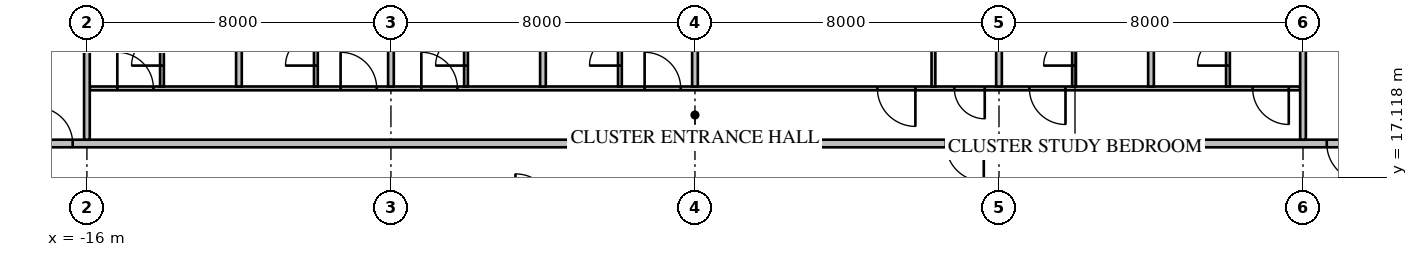
"""IFC4 building model, lengths in metres.
Left out: names, types, materials, properties, quantities, classifications, styles, units other than length and angle.
Written with IfcOpenShell. Run it as: python <this file> out.ifc"""

import sys

from ifc_helpers import new_model, si_unit, direction, frame, frame_2d, origin, place, context, subcontext, project, spatial, rectangle, extrude, element, fill, save


model = new_model("IFC4")
c1 = context("Model", 3, precision=1e-05, world=origin(), true_north=direction((0.0, 1.0)))
c2 = subcontext(c1, "Body", "Model", "MODEL_VIEW")
j1 = project(units=[si_unit("LENGTHUNIT", "METRE"), si_unit("PLANEANGLEUNIT", "RADIAN")], contexts=[c1])
p1 = place(None, origin())
s1 = spatial("IfcSite", under=j1, at=p1, CompositionType="ELEMENT")
p2 = place(p1, origin())
s2 = spatial("IfcBuilding", under=s1, at=p2, CompositionType="ELEMENT")
p3 = place(p2, frame((0.0, 0.0, 31.4)))
s3 = spatial("IfcBuildingStorey", under=s2, at=p3, CompositionType="ELEMENT", Elevation=31.4)
p4 = place(p3, frame((18.0, 18.0, 0.0), z_axis=(0.0, 0.0, 1.0), x_axis=(-1.0, 0.0, 0.0)))
e1 = element("IfcWall", 1, at=p4, inside=s3, PredefinedType="PARTITIONING", context=c2, shape_type="SweptSolid", body=[
    extrude(rectangle(XDim=36.0, YDim=0.2, at=frame_2d((18.0, 0.0))), origin(), (0.0, 0.0, 1.0), 3.65),
])
p5 = place(p4, frame((10.4, 0.0, 0.0)))
e2 = element("IfcOpeningElement", 2, at=p5, cuts=e1, PredefinedType="OPENING", context=c2, shape_type="SweptSolid", body=[
    extrude(rectangle(XDim=1.0, YDim=2.1, at=frame_2d((0.5, 1.05))), frame((0.0, 0.12, 0.0), z_axis=(0.0, -1.0, 0.0), x_axis=(1.0, 0.0, 0.0)), (0.0, 0.0, 1.0), 0.24),
])
p6 = place(p4, frame((0.375, 0.0, 0.0)))
e3 = element("IfcOpeningElement", 3, at=p6, cuts=e1, PredefinedType="OPENING", context=c2, shape_type="SweptSolid", body=[
    extrude(rectangle(XDim=1.0, YDim=2.1, at=frame_2d((0.5, 1.05))), frame((0.0, 0.12, 0.0), z_axis=(0.0, -1.0, 0.0), x_axis=(1.0, 0.0, 0.0)), (0.0, 0.0, 1.0), 0.24),
])
p7 = place(p4, frame((34.375, 0.0, 0.0)))
e4 = element("IfcOpeningElement", 4, at=p7, cuts=e1, PredefinedType="OPENING", context=c2, shape_type="SweptSolid", body=[
    extrude(rectangle(XDim=0.95, YDim=2.1, at=frame_2d((0.475, 1.05))), frame((0.0, 0.12, 0.0), z_axis=(0.0, -1.0, 0.0), x_axis=(1.0, 0.0, 0.0)), (0.0, 0.0, 1.0), 0.24),
])
p8 = place(p3, frame((15.925, 19.45, 0.0), z_axis=(0.0, 0.0, 1.0), x_axis=(-1.0, 0.0, 0.0)))
e5 = element("IfcWall", 5, at=p8, inside=s3, PredefinedType="PARTITIONING", context=c2, shape_type="SweptSolid", body=[
    extrude(rectangle(XDim=31.85, YDim=0.1, at=frame_2d((15.925, 0.0))), origin(), (0.0, 0.0, 1.0), 3.65),
])
p9 = place(p8, frame((10.125, 0.0, 0.0)))
e6 = element("IfcOpeningElement", 6, at=p9, cuts=e5, PredefinedType="OPENING", context=c2, shape_type="SweptSolid", body=[
    extrude(rectangle(XDim=1.0, YDim=2.1, at=frame_2d((0.5, 1.05))), frame((0.0, 0.07, 0.0), z_axis=(0.0, -1.0, 0.0), x_axis=(1.0, 0.0, 0.0)), (0.0, 0.0, 1.0), 0.14),
])
p10 = place(p8, frame((8.3, 0.0, 0.0)))
e7 = element("IfcOpeningElement", 7, at=p10, cuts=e5, PredefinedType="OPENING", context=c2, shape_type="SweptSolid", body=[
    extrude(rectangle(XDim=0.8, YDim=2.1, at=frame_2d((0.4, 1.05))), frame((0.0, 0.07, 0.0), z_axis=(0.0, -1.0, 0.0), x_axis=(1.0, 0.0, 0.0)), (0.0, 0.0, 1.0), 0.14),
])
p11 = place(p8, frame((0.3, 0.0, 0.0)))
e8 = element("IfcOpeningElement", 8, at=p11, cuts=e5, PredefinedType="OPENING", context=c2, shape_type="SweptSolid", body=[
    extrude(rectangle(XDim=0.95, YDim=2.1, at=frame_2d((0.475, 1.05))), frame((0.0, 0.07, 0.0), z_axis=(0.0, -1.0, 0.0), x_axis=(1.0, 0.0, 0.0)), (0.0, 0.0, 1.0), 0.14),
])
p12 = place(p8, frame((6.175, 0.0, 0.0)))
e9 = element("IfcOpeningElement", 9, at=p12, cuts=e5, PredefinedType="OPENING", context=c2, shape_type="SweptSolid", body=[
    extrude(rectangle(XDim=0.95, YDim=2.1, at=frame_2d((0.475, 1.05))), frame((0.0, 0.07, 0.0), z_axis=(0.0, -1.0, 0.0), x_axis=(1.0, 0.0, 0.0)), (0.0, 0.0, 1.0), 0.14),
])
p13 = place(p8, frame((16.3, 0.0, 0.0)))
e10 = element("IfcOpeningElement", 10, at=p13, cuts=e5, PredefinedType="OPENING", context=c2, shape_type="SweptSolid", body=[
    extrude(rectangle(XDim=0.95, YDim=2.1, at=frame_2d((0.475, 1.05))), frame((0.0, 0.07, 0.0), z_axis=(0.0, -1.0, 0.0), x_axis=(1.0, 0.0, 0.0)), (0.0, 0.0, 1.0), 0.14),
])
p14 = place(p8, frame((22.175, 0.0, 0.0)))
e11 = element("IfcOpeningElement", 11, at=p14, cuts=e5, PredefinedType="OPENING", context=c2, shape_type="SweptSolid", body=[
    extrude(rectangle(XDim=0.95, YDim=2.1, at=frame_2d((0.475, 1.05))), frame((0.0, 0.07, 0.0), z_axis=(0.0, -1.0, 0.0), x_axis=(1.0, 0.0, 0.0)), (0.0, 0.0, 1.0), 0.14),
])
p15 = place(p8, frame((24.3, 0.0, 0.0)))
e12 = element("IfcOpeningElement", 12, at=p15, cuts=e5, PredefinedType="OPENING", context=c2, shape_type="SweptSolid", body=[
    extrude(rectangle(XDim=0.95, YDim=2.1, at=frame_2d((0.475, 1.05))), frame((0.0, 0.07, 0.0), z_axis=(0.0, -1.0, 0.0), x_axis=(1.0, 0.0, 0.0)), (0.0, 0.0, 1.0), 0.14),
])
p16 = place(p8, frame((30.175, 0.0, 0.0)))
e13 = element("IfcOpeningElement", 13, at=p16, cuts=e5, PredefinedType="OPENING", context=c2, shape_type="SweptSolid", body=[
    extrude(rectangle(XDim=0.95, YDim=2.1, at=frame_2d((0.475, 1.05))), frame((0.0, 0.07, 0.0), z_axis=(0.0, -1.0, 0.0), x_axis=(1.0, 0.0, 0.0)), (0.0, 0.0, 1.0), 0.14),
])
p17 = place(p3, frame((6.275, 19.5, 0.0), z_axis=(0.0, 0.0, 1.0), x_axis=(0.0, 1.0, 0.0)))
e14 = element("IfcWall", 14, at=p17, inside=s3, PredefinedType="PARTITIONING", context=c2, shape_type="SweptSolid", body=[
    extrude(rectangle(XDim=2.1, YDim=0.1, at=frame_2d((1.05, 0.0))), origin(), (0.0, 0.0, 1.0), 3.65),
])
p18 = place(p3, frame((16.0, 18.1, 0.0), z_axis=(0.0, 0.0, 1.0), x_axis=(0.0, 1.0, 0.0)))
e15 = element("IfcWall", 15, at=p18, inside=s3, PredefinedType="PARTITIONING", context=c2, shape_type="SweptSolid", body=[
    extrude(rectangle(XDim=6.589, YDim=0.15, at=frame_2d((3.295, 0.0))), origin(), (0.0, 0.0, 1.0), 3.65),
])
for number, where, z_axis, x_axis in (
    (16, (12.0, 19.5, 0.0), (0.0, 0.0, 1.0), (0.0, 1.0, 0.0)),
    (17, (8.0, 19.5, 0.0), (0.0, 0.0, 1.0), (0.0, 1.0, 0.0)),
):
    element("IfcWall", number, at=place(p3, frame(where, z_axis=z_axis, x_axis=x_axis)), inside=s3, PredefinedType="PARTITIONING", context=c2, shape_type="SweptSolid", body=[
        extrude(rectangle(XDim=5.2, YDim=0.15, at=frame_2d((2.6, 0.0))), origin(), (0.0, 0.0, 1.0), 3.65),
    ])
p19 = place(p3, frame((0.0, 19.5, 0.0), z_axis=(0.0, 0.0, 1.0), x_axis=(0.0, 1.0, 0.0)))
e18 = element("IfcWall", 18, at=p19, inside=s3, PredefinedType="PARTITIONING", context=c2, shape_type="SweptSolid", body=[
    extrude(rectangle(XDim=5.2, YDim=0.15, at=frame_2d((2.6, 0.0))), origin(), (0.0, 0.0, 1.0), 2.809),
])
for number, where, z_axis, x_axis in (
    (19, (-4.0, 19.5, 0.0), (0.0, 0.0, 1.0), (0.0, 1.0, 0.0)),
    (20, (-8.0, 19.5, 0.0), (0.0, 0.0, 1.0), (0.0, 1.0, 0.0)),
    (21, (-12.0, 19.5, 0.0), (0.0, 0.0, 1.0), (0.0, 1.0, 0.0)),
):
    element("IfcWall", number, at=place(p3, frame(where, z_axis=z_axis, x_axis=x_axis)), inside=s3, PredefinedType="PARTITIONING", context=c2, shape_type="SweptSolid", body=[
        extrude(rectangle(XDim=5.2, YDim=0.15, at=frame_2d((2.6, 0.0))), origin(), (0.0, 0.0, 1.0), 3.65),
    ])
p20 = place(p3, frame((-16.0, 18.1, 0.0), z_axis=(0.0, 0.0, 1.0), x_axis=(0.0, 1.0, 0.0)))
e22 = element("IfcWall", 22, at=p20, inside=s3, PredefinedType="PARTITIONING", context=c2, shape_type="SweptSolid", body=[
    extrude(rectangle(XDim=6.589, YDim=0.15, at=frame_2d((3.295, 0.0))), origin(), (0.0, 0.0, 1.0), 3.65),
])
p21 = place(p3, frame((14.025, 19.5, 0.0), z_axis=(0.0, 0.0, 1.0), x_axis=(0.0, 1.0, 0.0)))
e23 = element("IfcWall", 23, at=p21, inside=s3, PredefinedType="PARTITIONING", context=c2, shape_type="SweptSolid", body=[
    extrude(rectangle(XDim=2.0, YDim=0.1, at=frame_2d((1.0, 0.0))), origin(), (0.0, 0.0, 1.0), 3.65),
])
p22 = place(p21, frame((0.55, 0.0, 0.0)))
e24 = element("IfcOpeningElement", 24, at=p22, cuts=e23, PredefinedType="OPENING", context=c2, shape_type="SweptSolid", body=[
    extrude(rectangle(XDim=0.8, YDim=2.1, at=frame_2d((0.4, 1.05))), frame((0.0, 0.07, 0.0), z_axis=(0.0, -1.0, 0.0), x_axis=(1.0, 0.0, 0.0)), (0.0, 0.0, 1.0), 0.14),
])
p23 = place(p3, frame((9.975, 19.5, 0.0), z_axis=(0.0, 0.0, 1.0), x_axis=(0.0, 1.0, 0.0)))
e25 = element("IfcWall", 25, at=p23, inside=s3, PredefinedType="PARTITIONING", context=c2, shape_type="SweptSolid", body=[
    extrude(rectangle(XDim=2.0, YDim=0.1, at=frame_2d((1.0, 0.0))), origin(), (0.0, 0.0, 1.0), 3.65),
])
p24 = place(p23, frame((0.55, 0.0, 0.0)))
e26 = element("IfcOpeningElement", 26, at=p24, cuts=e25, PredefinedType="OPENING", context=c2, shape_type="SweptSolid", body=[
    extrude(rectangle(XDim=0.8, YDim=2.1, at=frame_2d((0.4, 1.05))), frame((0.0, 0.07, 0.0), z_axis=(0.0, -1.0, 0.0), x_axis=(1.0, 0.0, 0.0)), (0.0, 0.0, 1.0), 0.14),
])
p25 = place(p3, frame((-1.975, 19.5, 0.0), z_axis=(0.0, 0.0, 1.0), x_axis=(0.0, 1.0, 0.0)))
e27 = element("IfcWall", 27, at=p25, inside=s3, PredefinedType="PARTITIONING", context=c2, shape_type="SweptSolid", body=[
    extrude(rectangle(XDim=2.0, YDim=0.1, at=frame_2d((1.0, 0.0))), origin(), (0.0, 0.0, 1.0), 3.65),
])
p26 = place(p25, frame((0.55, 0.0, 0.0)))
e28 = element("IfcOpeningElement", 28, at=p26, cuts=e27, PredefinedType="OPENING", context=c2, shape_type="SweptSolid", body=[
    extrude(rectangle(XDim=0.8, YDim=2.1, at=frame_2d((0.4, 1.05))), frame((0.0, 0.07, 0.0), z_axis=(0.0, -1.0, 0.0), x_axis=(1.0, 0.0, 0.0)), (0.0, 0.0, 1.0), 0.14),
])
p27 = place(p3, frame((-6.025, 19.5, 0.0), z_axis=(0.0, 0.0, 1.0), x_axis=(0.0, 1.0, 0.0)))
e29 = element("IfcWall", 29, at=p27, inside=s3, PredefinedType="PARTITIONING", context=c2, shape_type="SweptSolid", body=[
    extrude(rectangle(XDim=2.0, YDim=0.1, at=frame_2d((1.0, 0.0))), origin(), (0.0, 0.0, 1.0), 3.65),
])
p28 = place(p27, frame((0.55, 0.0, 0.0)))
e30 = element("IfcOpeningElement", 30, at=p28, cuts=e29, PredefinedType="OPENING", context=c2, shape_type="SweptSolid", body=[
    extrude(rectangle(XDim=0.8, YDim=2.1, at=frame_2d((0.4, 1.05))), frame((0.0, 0.07, 0.0), z_axis=(0.0, -1.0, 0.0), x_axis=(1.0, 0.0, 0.0)), (0.0, 0.0, 1.0), 0.14),
])
p29 = place(p3, frame((-9.975, 19.5, 0.0), z_axis=(0.0, 0.0, 1.0), x_axis=(0.0, 1.0, 0.0)))
e31 = element("IfcWall", 31, at=p29, inside=s3, PredefinedType="PARTITIONING", context=c2, shape_type="SweptSolid", body=[
    extrude(rectangle(XDim=2.0, YDim=0.1, at=frame_2d((1.0, 0.0))), origin(), (0.0, 0.0, 1.0), 3.65),
])
p30 = place(p29, frame((0.55, 0.0, 0.0)))
e32 = element("IfcOpeningElement", 32, at=p30, cuts=e31, PredefinedType="OPENING", context=c2, shape_type="SweptSolid", body=[
    extrude(rectangle(XDim=0.8, YDim=2.1, at=frame_2d((0.4, 1.05))), frame((0.0, 0.07, 0.0), z_axis=(0.0, -1.0, 0.0), x_axis=(1.0, 0.0, 0.0)), (0.0, 0.0, 1.0), 0.14),
])
p31 = place(p3, frame((-14.025, 19.5, 0.0), z_axis=(0.0, 0.0, 1.0), x_axis=(0.0, 1.0, 0.0)))
e33 = element("IfcWall", 33, at=p31, inside=s3, PredefinedType="PARTITIONING", context=c2, shape_type="SweptSolid", body=[
    extrude(rectangle(XDim=2.0, YDim=0.1, at=frame_2d((1.0, 0.0))), origin(), (0.0, 0.0, 1.0), 3.65),
])
p32 = place(p31, frame((0.55, 0.0, 0.0)))
e34 = element("IfcOpeningElement", 34, at=p32, cuts=e33, PredefinedType="OPENING", context=c2, shape_type="SweptSolid", body=[
    extrude(rectangle(XDim=0.8, YDim=2.1, at=frame_2d((0.4, 1.05))), frame((0.0, 0.07, 0.0), z_axis=(0.0, -1.0, 0.0), x_axis=(1.0, 0.0, 0.0)), (0.0, 0.0, 1.0), 0.14),
])
p33 = place(p5, origin())
e35 = element("IfcDoor", 35, at=p33, inside=s3, OperationType="SINGLE_SWING_LEFT", PredefinedType="DOOR", context=c2, shape_type="SweptSolid", body=[
    extrude(rectangle(XDim=1.0, YDim=2.1, at=frame_2d((0.5, 1.05))), frame((0.0, 0.025, 0.0), z_axis=(0.0, -1.0, 0.0), x_axis=(1.0, 0.0, 0.0)), (0.0, 0.0, 1.0), 0.05),
])
fill(e2, e35)
p34 = place(p9, origin())
e36 = element("IfcDoor", 36, at=p34, inside=s3, OperationType="SINGLE_SWING_LEFT", PredefinedType="DOOR", context=c2, shape_type="SweptSolid", body=[
    extrude(rectangle(XDim=1.0, YDim=2.1, at=frame_2d((0.5, 1.05))), frame((0.0, 0.025, 0.0), z_axis=(0.0, -1.0, 0.0), x_axis=(1.0, 0.0, 0.0)), (0.0, 0.0, 1.0), 0.05),
])
fill(e6, e36)
p35 = place(p10, origin())
e37 = element("IfcDoor", 37, at=p35, inside=s3, OperationType="SINGLE_SWING_LEFT", PredefinedType="DOOR", context=c2, shape_type="SweptSolid", body=[
    extrude(rectangle(XDim=0.8, YDim=2.1, at=frame_2d((0.4, 1.05))), frame((0.0, 0.025, 0.0), z_axis=(0.0, -1.0, 0.0), x_axis=(1.0, 0.0, 0.0)), (0.0, 0.0, 1.0), 0.05),
])
fill(e7, e37)
p36 = place(p6, origin())
e38 = element("IfcDoor", 38, at=p36, inside=s3, OperationType="SINGLE_SWING_LEFT", PredefinedType="DOOR", context=c2, shape_type="SweptSolid", body=[
    extrude(rectangle(XDim=1.0, YDim=2.1, at=frame_2d((0.5, 1.05))), frame((0.0, 0.025, 0.0), z_axis=(0.0, -1.0, 0.0), x_axis=(1.0, 0.0, 0.0)), (0.0, 0.0, 1.0), 0.05),
])
fill(e3, e38)
p37 = place(p11, origin())
e39 = element("IfcDoor", 39, at=p37, inside=s3, OperationType="SINGLE_SWING_LEFT", PredefinedType="DOOR", context=c2, shape_type="SweptSolid", body=[
    extrude(rectangle(XDim=0.95, YDim=2.1, at=frame_2d((0.475, 1.05))), frame((0.0, 0.025, 0.0), z_axis=(0.0, -1.0, 0.0), x_axis=(1.0, 0.0, 0.0)), (0.0, 0.0, 1.0), 0.05),
])
fill(e8, e39)
p38 = place(p22, origin())
e40 = element("IfcDoor", 40, at=p38, inside=s3, OperationType="SINGLE_SWING_LEFT", PredefinedType="DOOR", context=c2, shape_type="SweptSolid", body=[
    extrude(rectangle(XDim=0.8, YDim=2.1, at=frame_2d((0.4, 1.05))), frame((0.0, 0.025, 0.0), z_axis=(0.0, -1.0, 0.0), x_axis=(1.0, 0.0, 0.0)), (0.0, 0.0, 1.0), 0.05),
])
fill(e24, e40)
p39 = place(p12, origin())
e41 = element("IfcDoor", 41, at=p39, inside=s3, OperationType="SINGLE_SWING_LEFT", PredefinedType="DOOR", context=c2, shape_type="SweptSolid", body=[
    extrude(rectangle(XDim=0.95, YDim=2.1, at=frame_2d((0.475, 1.05))), frame((0.0, 0.025, 0.0), z_axis=(0.0, -1.0, 0.0), x_axis=(1.0, 0.0, 0.0)), (0.0, 0.0, 1.0), 0.05),
])
fill(e9, e41)
p40 = place(p24, origin())
e42 = element("IfcDoor", 42, at=p40, inside=s3, OperationType="SINGLE_SWING_LEFT", PredefinedType="DOOR", context=c2, shape_type="SweptSolid", body=[
    extrude(rectangle(XDim=0.8, YDim=2.1, at=frame_2d((0.4, 1.05))), frame((0.0, 0.025, 0.0), z_axis=(0.0, -1.0, 0.0), x_axis=(1.0, 0.0, 0.0)), (0.0, 0.0, 1.0), 0.05),
])
fill(e26, e42)
p41 = place(p13, origin())
e43 = element("IfcDoor", 43, at=p41, inside=s3, OperationType="SINGLE_SWING_RIGHT", PredefinedType="DOOR", context=c2, shape_type="SweptSolid", body=[
    extrude(rectangle(XDim=0.95, YDim=2.1, at=frame_2d((0.475, 1.05))), frame((0.0, 0.025, 0.0), z_axis=(0.0, -1.0, 0.0), x_axis=(1.0, 0.0, 0.0)), (0.0, 0.0, 1.0), 0.05),
])
fill(e10, e43)
p42 = place(p26, origin())
e44 = element("IfcDoor", 44, at=p42, inside=s3, OperationType="SINGLE_SWING_LEFT", PredefinedType="DOOR", context=c2, shape_type="SweptSolid", body=[
    extrude(rectangle(XDim=0.8, YDim=2.1, at=frame_2d((0.4, 1.05))), frame((0.0, 0.025, 0.0), z_axis=(0.0, -1.0, 0.0), x_axis=(1.0, 0.0, 0.0)), (0.0, 0.0, 1.0), 0.05),
])
fill(e28, e44)
p43 = place(p14, origin())
e45 = element("IfcDoor", 45, at=p43, inside=s3, OperationType="SINGLE_SWING_RIGHT", PredefinedType="DOOR", context=c2, shape_type="SweptSolid", body=[
    extrude(rectangle(XDim=0.95, YDim=2.1, at=frame_2d((0.475, 1.05))), frame((0.0, 0.025, 0.0), z_axis=(0.0, -1.0, 0.0), x_axis=(1.0, 0.0, 0.0)), (0.0, 0.0, 1.0), 0.05),
])
fill(e11, e45)
p44 = place(p28, origin())
e46 = element("IfcDoor", 46, at=p44, inside=s3, OperationType="SINGLE_SWING_LEFT", PredefinedType="DOOR", context=c2, shape_type="SweptSolid", body=[
    extrude(rectangle(XDim=0.8, YDim=2.1, at=frame_2d((0.4, 1.05))), frame((0.0, 0.025, 0.0), z_axis=(0.0, -1.0, 0.0), x_axis=(1.0, 0.0, 0.0)), (0.0, 0.0, 1.0), 0.05),
])
fill(e30, e46)
p45 = place(p15, origin())
e47 = element("IfcDoor", 47, at=p45, inside=s3, OperationType="SINGLE_SWING_RIGHT", PredefinedType="DOOR", context=c2, shape_type="SweptSolid", body=[
    extrude(rectangle(XDim=0.95, YDim=2.1, at=frame_2d((0.475, 1.05))), frame((0.0, 0.025, 0.0), z_axis=(0.0, -1.0, 0.0), x_axis=(1.0, 0.0, 0.0)), (0.0, 0.0, 1.0), 0.05),
])
fill(e12, e47)
p46 = place(p30, origin())
e48 = element("IfcDoor", 48, at=p46, inside=s3, OperationType="SINGLE_SWING_LEFT", PredefinedType="DOOR", context=c2, shape_type="SweptSolid", body=[
    extrude(rectangle(XDim=0.8, YDim=2.1, at=frame_2d((0.4, 1.05))), frame((0.0, 0.025, 0.0), z_axis=(0.0, -1.0, 0.0), x_axis=(1.0, 0.0, 0.0)), (0.0, 0.0, 1.0), 0.05),
])
fill(e32, e48)
p47 = place(p16, origin())
e49 = element("IfcDoor", 49, at=p47, inside=s3, OperationType="SINGLE_SWING_RIGHT", PredefinedType="DOOR", context=c2, shape_type="SweptSolid", body=[
    extrude(rectangle(XDim=0.95, YDim=2.1, at=frame_2d((0.475, 1.05))), frame((0.0, 0.025, 0.0), z_axis=(0.0, -1.0, 0.0), x_axis=(1.0, 0.0, 0.0)), (0.0, 0.0, 1.0), 0.05),
])
fill(e13, e49)
p48 = place(p32, origin())
e50 = element("IfcDoor", 50, at=p48, inside=s3, OperationType="SINGLE_SWING_LEFT", PredefinedType="DOOR", context=c2, shape_type="SweptSolid", body=[
    extrude(rectangle(XDim=0.8, YDim=2.1, at=frame_2d((0.4, 1.05))), frame((0.0, 0.025, 0.0), z_axis=(0.0, -1.0, 0.0), x_axis=(1.0, 0.0, 0.0)), (0.0, 0.0, 1.0), 0.05),
])
fill(e34, e50)
p49 = place(p7, origin())
e51 = element("IfcDoor", 51, at=p49, inside=s3, OperationType="SINGLE_SWING_RIGHT", PredefinedType="DOOR", context=c2, shape_type="SweptSolid", body=[
    extrude(rectangle(XDim=0.95, YDim=2.1, at=frame_2d((0.475, 1.05))), frame((0.0, 0.025, 0.0), z_axis=(0.0, -1.0, 0.0), x_axis=(1.0, 0.0, 0.0)), (0.0, 0.0, 1.0), 0.05),
])
fill(e4, e51)
save(model, sys.argv[1])
